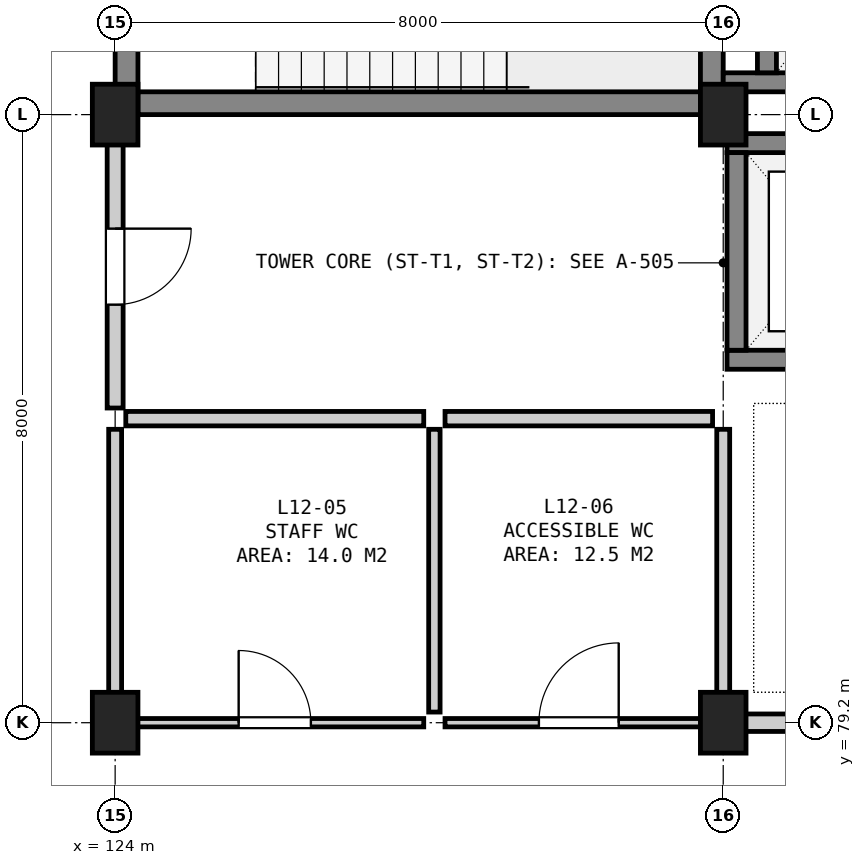
"""IFC4 building model, lengths in metres.
Left out: names, types, materials, properties, quantities, classifications, styles, units other than length and angle.
Written with IfcOpenShell. Run it as: python <this file> out.ifc"""

import sys

from ifc_helpers import new_model, si_unit, direction, frame, frame_2d, origin, origin_2d, place, context, subcontext, project, spatial, rectangle, extrude, element, fill, save


model = new_model("IFC4")
c1 = context("Model", 3, precision=1e-05, world=origin(), true_north=direction((0.0, 1.0)))
c2 = subcontext(c1, "Body", "Model", "MODEL_VIEW")
j1 = project(units=[si_unit("LENGTHUNIT", "METRE"), si_unit("PLANEANGLEUNIT", "RADIAN")], contexts=[c1])
p1 = place(None, origin())
s1 = spatial("IfcSite", under=j1, at=p1, CompositionType="ELEMENT")
p2 = place(p1, origin())
s2 = spatial("IfcBuilding", under=s1, at=p2, CompositionType="ELEMENT")
p3 = place(p2, frame((0.0, 0.0, 50.9)))
s3 = spatial("IfcBuildingStorey", under=s2, at=p3, CompositionType="ELEMENT", Elevation=50.9)
for number, where, z_axis, x_axis in (
    (1, (124.0, 79.2, 0.0), (0.0, 0.0, 1.0), (1.0, 0.0, 0.0)),
    (2, (124.0, 87.2, 0.0), (0.0, 0.0, 1.0), (1.0, 0.0, 0.0)),
    (3, (132.0, 79.2, 0.0), (0.0, 0.0, 1.0), (1.0, 0.0, 0.0)),
    (4, (132.0, 87.2, 0.0), (0.0, 0.0, 1.0), (1.0, 0.0, 0.0)),
):
    element("IfcColumn", number, at=place(p3, frame(where, z_axis=z_axis, x_axis=x_axis)), inside=s3, PredefinedType="COLUMN", context=c2, shape_type="SweptSolid", body=[
        extrude(rectangle(XDim=0.6, YDim=0.8, at=origin_2d()), origin(), (0.0, 0.0, 1.0), 3.9),
    ])
for number, where, z_axis, x_axis in (
    (5, (124.15, 87.2, 0.0), (0.0, 0.0, 1.0), (0.0, 1.0, 0.0)),
    (6, (131.85, 87.2, 0.0), (0.0, 0.0, 1.0), (0.0, 1.0, 0.0)),
):
    element("IfcWall", number, at=place(p3, frame(where, z_axis=z_axis, x_axis=x_axis)), inside=s3, PredefinedType="SHEAR", context=c2, shape_type="SweptSolid", body=[
        extrude(rectangle(XDim=4.2, YDim=0.3, at=frame_2d((2.1, 0.0))), origin(), (0.0, 0.0, 1.0), 3.62),
    ])
p4 = place(p3, frame((124.3, 87.35, 0.0), z_axis=(0.0, 0.0, 1.0), x_axis=(1.0, 0.0, 0.0)))
e7 = element("IfcWall", 7, at=p4, inside=s3, PredefinedType="SHEAR", context=c2, shape_type="SweptSolid", body=[
    extrude(rectangle(XDim=7.4, YDim=0.3, at=frame_2d((3.7, 0.0))), origin(), (0.0, 0.0, 1.0), 3.62),
])
p5 = place(p3, frame((132.0, 87.625, 0.0), z_axis=(0.0, 0.0, 1.0), x_axis=(1.0, 0.0, 0.0)))
e8 = element("IfcWall", 8, at=p5, inside=s3, PredefinedType="SHEAR", context=c2, shape_type="SweptSolid", body=[
    extrude(rectangle(XDim=3.15, YDim=0.25, at=frame_2d((1.575, 0.0))), origin(), (0.0, 0.0, 1.0), 3.62),
])
p6 = place(p3, frame((132.575, 87.75, 0.0), z_axis=(0.0, 0.0, 1.0), x_axis=(0.0, 1.0, 0.0)))
e9 = element("IfcWall", 9, at=p6, inside=s3, PredefinedType="SHEAR", context=c2, shape_type="SweptSolid", body=[
    extrude(rectangle(XDim=2.9, YDim=0.25, at=frame_2d((1.45, 0.0))), origin(), (0.0, 0.0, 1.0), 3.62),
])
p7 = place(p3, frame((132.05, 83.975, 0.0), z_axis=(0.0, 0.0, 1.0), x_axis=(1.0, 0.0, 0.0)))
e10 = element("IfcWall", 10, at=p7, inside=s3, PredefinedType="SHEAR", context=c2, shape_type="SweptSolid", body=[
    extrude(rectangle(XDim=2.7, YDim=0.25, at=frame_2d((1.35, 0.0))), origin(), (0.0, 0.0, 1.0), 3.62),
])
p8 = place(p7, frame((0.8, 0.0, 0.0)))
e11 = element("IfcOpeningElement", 11, at=p8, cuts=e10, PredefinedType="OPENING", context=c2, shape_type="SweptSolid", body=[
    extrude(rectangle(XDim=1.1, YDim=2.15, at=frame_2d((0.55, 1.075))), frame((0.0, 0.137, 0.0), z_axis=(0.0, -1.0, 0.0), x_axis=(1.0, 0.0, 0.0)), (0.0, 0.0, 1.0), 0.274),
])
p9 = place(p3, frame((132.05, 86.825, 0.0), z_axis=(0.0, 0.0, 1.0), x_axis=(1.0, 0.0, 0.0)))
e12 = element("IfcWall", 12, at=p9, inside=s3, PredefinedType="SHEAR", context=c2, shape_type="SweptSolid", body=[
    extrude(rectangle(XDim=2.7, YDim=0.25, at=frame_2d((1.35, 0.0))), origin(), (0.0, 0.0, 1.0), 3.62),
])
p10 = place(p3, frame((132.175, 84.1, 0.0), z_axis=(0.0, 0.0, 1.0), x_axis=(0.0, 1.0, 0.0)))
e13 = element("IfcWall", 13, at=p10, inside=s3, PredefinedType="SHEAR", context=c2, shape_type="SweptSolid", body=[
    extrude(rectangle(XDim=2.6, YDim=0.25, at=frame_2d((1.3, 0.0))), origin(), (0.0, 0.0, 1.0), 3.62),
])
p11 = place(p3, frame((124.14, 79.2, 0.0), z_axis=(0.0, 0.0, 1.0), x_axis=(1.0, 0.0, 0.0)))
e14 = element("IfcWall", 14, at=p11, inside=s3, PredefinedType="PARTITIONING", context=c2, shape_type="SweptSolid", body=[
    extrude(rectangle(XDim=3.92, YDim=0.11, at=frame_2d((1.96, 0.0))), origin(), (0.0, 0.0, 1.0), 2.955),
])
p12 = place(p11, frame((1.485, 0.0, 0.0)))
e15 = element("IfcOpeningElement", 15, at=p12, cuts=e14, PredefinedType="OPENING", context=c2, shape_type="SweptSolid", body=[
    extrude(rectangle(XDim=0.95, YDim=2.15, at=frame_2d((0.475, 1.075))), frame((0.0, 0.067, 0.0), z_axis=(0.0, -1.0, 0.0), x_axis=(1.0, 0.0, 0.0)), (0.0, 0.0, 1.0), 0.134),
])
p13 = place(p3, frame((124.14, 83.2, 0.0), z_axis=(0.0, 0.0, 1.0), x_axis=(1.0, 0.0, 0.0)))
e16 = element("IfcWall", 16, at=p13, inside=s3, PredefinedType="PARTITIONING", context=c2, shape_type="SweptSolid", body=[
    extrude(rectangle(XDim=3.92, YDim=0.19, at=frame_2d((1.96, 0.0))), origin(), (0.0, 0.0, 1.0), 3.62),
])
p14 = place(p3, frame((124.0, 79.34, 0.0), z_axis=(0.0, 0.0, 1.0), x_axis=(0.0, 1.0, 0.0)))
e17 = element("IfcWall", 17, at=p14, inside=s3, PredefinedType="PARTITIONING", context=c2, shape_type="SweptSolid", body=[
    extrude(rectangle(XDim=3.72, YDim=0.17, at=frame_2d((1.86, 0.0))), origin(), (0.0, 0.0, 1.0), 3.005),
])
p15 = place(p3, frame((128.2, 79.34, 0.0), z_axis=(0.0, 0.0, 1.0), x_axis=(0.0, 1.0, 0.0)))
e18 = element("IfcWall", 18, at=p15, inside=s3, PredefinedType="PARTITIONING", context=c2, shape_type="SweptSolid", body=[
    extrude(rectangle(XDim=3.72, YDim=0.15, at=frame_2d((1.86, 0.0))), origin(), (0.0, 0.0, 1.0), 3.62),
])
p16 = place(p3, frame((128.34, 79.2, 0.0), z_axis=(0.0, 0.0, 1.0), x_axis=(1.0, 0.0, 0.0)))
e19 = element("IfcWall", 19, at=p16, inside=s3, PredefinedType="PARTITIONING", context=c2, shape_type="SweptSolid", body=[
    extrude(rectangle(XDim=3.52, YDim=0.11, at=frame_2d((1.76, 0.0))), origin(), (0.0, 0.0, 1.0), 2.955),
])
p17 = place(p16, frame((1.235, 0.0, 0.0)))
e20 = element("IfcOpeningElement", 20, at=p17, cuts=e19, PredefinedType="OPENING", context=c2, shape_type="SweptSolid", body=[
    extrude(rectangle(XDim=1.05, YDim=2.15, at=frame_2d((0.525, 1.075))), frame((0.0, 0.067, 0.0), z_axis=(0.0, -1.0, 0.0), x_axis=(1.0, 0.0, 0.0)), (0.0, 0.0, 1.0), 0.134),
])
p18 = place(p3, frame((128.34, 83.2, 0.0), z_axis=(0.0, 0.0, 1.0), x_axis=(1.0, 0.0, 0.0)))
e21 = element("IfcWall", 21, at=p18, inside=s3, PredefinedType="PARTITIONING", context=c2, shape_type="SweptSolid", body=[
    extrude(rectangle(XDim=3.52, YDim=0.19, at=frame_2d((1.76, 0.0))), origin(), (0.0, 0.0, 1.0), 3.62),
])
p19 = place(p3, frame((132.0, 79.34, 0.0), z_axis=(0.0, 0.0, 1.0), x_axis=(0.0, 1.0, 0.0)))
e22 = element("IfcWall", 22, at=p19, inside=s3, PredefinedType="PARTITIONING", context=c2, shape_type="SweptSolid", body=[
    extrude(rectangle(XDim=3.72, YDim=0.17, at=frame_2d((1.86, 0.0))), origin(), (0.0, 0.0, 1.0), 3.155),
])
p20 = place(p3, frame((124.0, 83.34, 0.0), z_axis=(0.0, 0.0, 1.0), x_axis=(0.0, 1.0, 0.0)))
e23 = element("IfcWall", 23, at=p20, inside=s3, PredefinedType="SOLIDWALL", context=c2, shape_type="SweptSolid", body=[
    extrude(rectangle(XDim=3.72, YDim=0.21, at=frame_2d((1.86, 0.0))), origin(), (0.0, 0.0, 1.0), 3.005),
])
p21 = place(p20, frame((1.36, 0.0, 0.0)))
e24 = element("IfcOpeningElement", 24, at=p21, cuts=e23, PredefinedType="OPENING", context=c2, shape_type="SweptSolid", body=[
    extrude(rectangle(XDim=1.0, YDim=2.15, at=frame_2d((0.5, 1.075))), frame((0.0, 0.117, 0.0), z_axis=(0.0, -1.0, 0.0), x_axis=(1.0, 0.0, 0.0)), (0.0, 0.0, 1.0), 0.234),
])
p22 = place(p3, frame((132.14, 79.2, 0.0), z_axis=(0.0, 0.0, 1.0), x_axis=(1.0, 0.0, 0.0)))
e25 = element("IfcWall", 25, at=p22, inside=s3, PredefinedType="SOLIDWALL", context=c2, shape_type="SweptSolid", body=[
    extrude(rectangle(XDim=7.72, YDim=0.23, at=frame_2d((3.86, 0.0))), origin(), (0.0, 0.0, 1.0), 3.005),
])
p23 = place(p22, frame((3.11, 0.0, 0.0)))
e26 = element("IfcOpeningElement", 26, at=p23, cuts=e25, PredefinedType="OPENING", context=c2, shape_type="SweptSolid", body=[
    extrude(rectangle(XDim=1.5, YDim=2.2, at=frame_2d((0.75, 1.1))), frame((0.0, 0.127, 0.0), z_axis=(0.0, -1.0, 0.0), x_axis=(1.0, 0.0, 0.0)), (0.0, 0.0, 1.0), 0.254),
])
p24 = place(p12, origin())
e27 = element("IfcDoor", 27, at=p24, inside=s3, OperationType="SINGLE_SWING_LEFT", PredefinedType="DOOR", context=c2, shape_type="SweptSolid", body=[
    extrude(rectangle(XDim=0.95, YDim=2.15, at=frame_2d((0.475, 1.075))), frame((0.0, 0.025, 0.0), z_axis=(0.0, -1.0, 0.0), x_axis=(1.0, 0.0, 0.0)), (0.0, 0.0, 1.0), 0.05),
])
fill(e15, e27)
p25 = place(p17, origin())
e28 = element("IfcDoor", 28, at=p25, inside=s3, OperationType="SINGLE_SWING_RIGHT", PredefinedType="DOOR", context=c2, shape_type="SweptSolid", body=[
    extrude(rectangle(XDim=1.05, YDim=2.15, at=frame_2d((0.525, 1.075))), frame((0.0, 0.025, 0.0), z_axis=(0.0, -1.0, 0.0), x_axis=(1.0, 0.0, 0.0)), (0.0, 0.0, 1.0), 0.05),
])
fill(e20, e28)
p26 = place(p21, frame((1.0, 0.0, 0.0), z_axis=(0.0, 0.0, 1.0), x_axis=(-1.0, 0.0, 0.0)))
e29 = element("IfcDoor", 29, at=p26, inside=s3, OperationType="SINGLE_SWING_LEFT", PredefinedType="DOOR", context=c2, shape_type="SweptSolid", body=[
    extrude(rectangle(XDim=1.0, YDim=2.15, at=frame_2d((0.5, 1.075))), frame((0.0, 0.025, 0.0), z_axis=(0.0, -1.0, 0.0), x_axis=(1.0, 0.0, 0.0)), (0.0, 0.0, 1.0), 0.05),
])
fill(e24, e29)
save(model, sys.argv[1])
